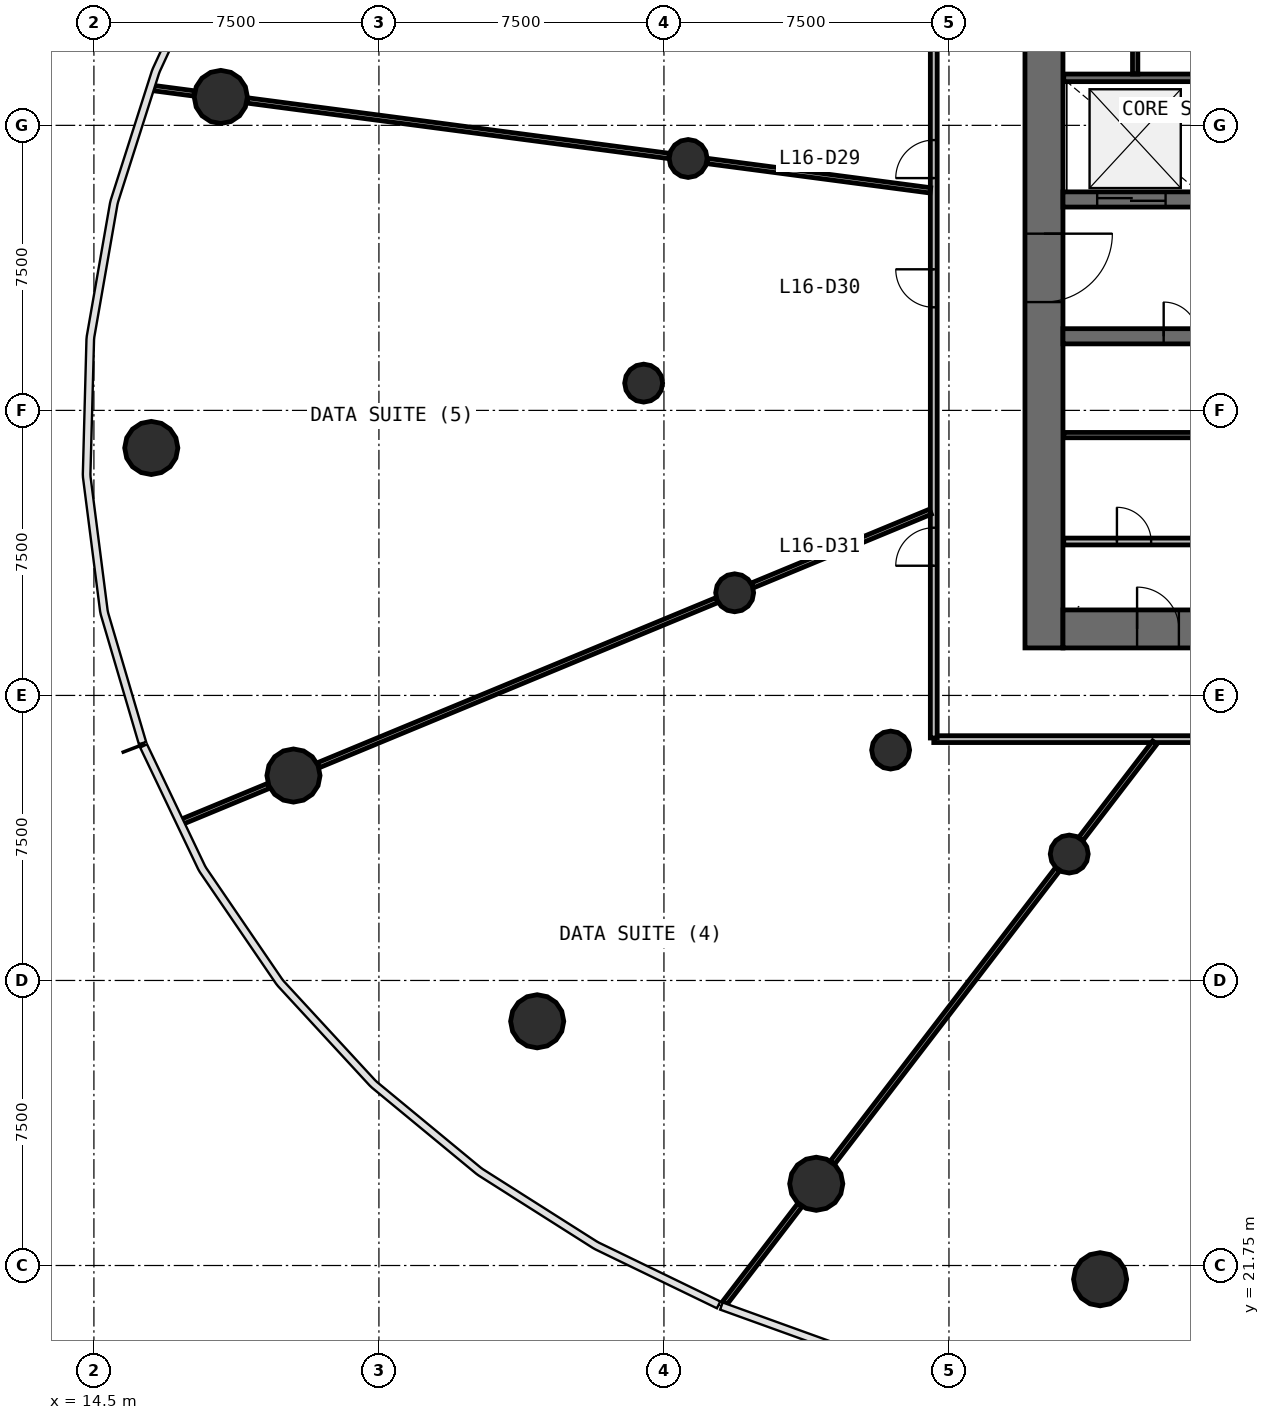
"""IFC4 building model, lengths in metres.
Left out: names, types, materials, properties, quantities, classifications, styles, units other than length and angle.
Written with IfcOpenShell. Run it as: python <this file> out.ifc"""

import sys

from ifc_helpers import new_model, si_unit, direction, frame, frame_2d, origin, origin_2d, place, context, subcontext, project, spatial, rectangle, circle, extrude, source, transform, mapped, element, fill, save


model = new_model("IFC4")
c1 = context("Model", 3, precision=1e-05, world=origin(), true_north=direction((0.0, 1.0)))
c2 = subcontext(c1, "Body", "Model", "MODEL_VIEW")
j1 = project(units=[si_unit("LENGTHUNIT", "METRE"), si_unit("PLANEANGLEUNIT", "RADIAN")], contexts=[c1])
p1 = place(None, origin())
s1 = spatial("IfcSite", under=j1, at=p1, CompositionType="ELEMENT")
p2 = place(p1, origin())
s2 = spatial("IfcBuilding", under=s1, at=p2, CompositionType="ELEMENT")
p3 = place(p2, frame((0.0, 0.0, 71.0)))
s3 = spatial("IfcBuildingStorey", under=s2, at=p3, CompositionType="ELEMENT", Elevation=71.0)
p4 = place(p3, frame((39.5, 58.0, 0.0), z_axis=(0.0, 0.0, 1.0), x_axis=(0.0, -1.0, 0.0)))
e1 = element("IfcWall", 1, at=p4, inside=s3, PredefinedType="SHEAR", context=c2, shape_type="SweptSolid", body=[
    extrude(rectangle(XDim=20.0, YDim=1.0, at=frame_2d((10.0, 0.0))), origin(), (0.0, 0.0, 1.0), 4.4),
])
p5 = place(p4, frame((9.1, 0.0, 0.0)))
e2 = element("IfcOpeningElement", 2, at=p5, cuts=e1, PredefinedType="OPENING", context=c2, shape_type="SweptSolid", body=[
    extrude(rectangle(XDim=1.8, YDim=2.1, at=frame_2d((0.9, 1.05))), frame((0.0, 0.51, 0.0), z_axis=(0.0, -1.0, 0.0), x_axis=(1.0, 0.0, 0.0)), (0.0, 0.0, 1.0), 1.02),
])
p6 = place(p3, frame((40.0, 38.5, 0.0), z_axis=(0.0, 0.0, 1.0), x_axis=(1.0, 0.0, 0.0)))
e3 = element("IfcWall", 3, at=p6, inside=s3, PredefinedType="SHEAR", context=c2, shape_type="SweptSolid", body=[
    extrude(rectangle(XDim=24.0, YDim=1.0, at=frame_2d((12.0, 0.0))), origin(), (0.0, 0.0, 1.0), 4.4),
])
p7 = place(p6, frame((21.45, 0.0, 0.0)))
e4 = element("IfcOpeningElement", 4, at=p7, cuts=e3, PredefinedType="OPENING", context=c2, shape_type="SweptSolid", body=[
    extrude(rectangle(XDim=1.1, YDim=2.1, at=frame_2d((0.55, 1.05))), frame((0.0, 0.51, 0.0), z_axis=(0.0, -1.0, 0.0), x_axis=(1.0, 0.0, 0.0)), (0.0, 0.0, 1.0), 1.02),
])
p8 = place(p6, frame((1.95, 0.0, 0.0)))
e5 = element("IfcOpeningElement", 5, at=p8, cuts=e3, PredefinedType="OPENING", context=c2, shape_type="SweptSolid", body=[
    extrude(rectangle(XDim=1.1, YDim=2.1, at=frame_2d((0.55, 1.05))), frame((0.0, 0.51, 0.0), z_axis=(0.0, -1.0, 0.0), x_axis=(1.0, 0.0, 0.0)), (0.0, 0.0, 1.0), 1.02),
])
p9 = place(p3, frame((40.0, 49.8, 0.0), z_axis=(0.0, 0.0, 1.0), x_axis=(1.0, 0.0, 0.0)))
e6 = element("IfcWall", 6, at=p9, inside=s3, PredefinedType="SHEAR", context=c2, shape_type="SweptSolid", body=[
    extrude(rectangle(XDim=24.0, YDim=0.4, at=frame_2d((12.0, 0.0))), origin(), (0.0, 0.0, 1.0), 4.4),
])
p10 = place(p9, frame((4.5, 0.0, 0.0)))
e7 = element("IfcOpeningElement", 7, at=p10, cuts=e6, PredefinedType="OPENING", context=c2, shape_type="SweptSolid", body=[
    extrude(rectangle(XDim=1.1, YDim=2.1, at=frame_2d((0.55, 1.05))), frame((0.0, 0.21, 0.0), z_axis=(0.0, -1.0, 0.0), x_axis=(1.0, 0.0, 0.0)), (0.0, 0.0, 1.0), 0.42),
])
p11 = place(p9, frame((7.0, 0.0, 0.0)))
e8 = element("IfcOpeningElement", 8, at=p11, cuts=e6, PredefinedType="OPENING", context=c2, shape_type="SweptSolid", body=[
    extrude(rectangle(XDim=1.1, YDim=2.1, at=frame_2d((0.55, 1.05))), frame((0.0, 0.21, 0.0), z_axis=(0.0, -1.0, 0.0), x_axis=(1.0, 0.0, 0.0)), (0.0, 0.0, 1.0), 0.42),
])
p12 = place(p9, frame((9.5, 0.0, 0.0)))
e9 = element("IfcOpeningElement", 9, at=p12, cuts=e6, PredefinedType="OPENING", context=c2, shape_type="SweptSolid", body=[
    extrude(rectangle(XDim=1.1, YDim=2.1, at=frame_2d((0.55, 1.05))), frame((0.0, 0.21, 0.0), z_axis=(0.0, -1.0, 0.0), x_axis=(1.0, 0.0, 0.0)), (0.0, 0.0, 1.0), 0.42),
])
p13 = place(p9, frame((0.9, 0.0, 0.0)))
e10 = element("IfcOpeningElement", 10, at=p13, cuts=e6, PredefinedType="OPENING", context=c2, shape_type="SweptSolid", body=[
    extrude(rectangle(XDim=1.8, YDim=2.4, at=frame_2d((0.9, 1.2))), frame((0.0, 0.21, 0.0), z_axis=(0.0, -1.0, 0.0), x_axis=(1.0, 0.0, 0.0)), (0.0, 0.0, 1.0), 0.42),
])
p14 = place(p9, frame((20.45, 0.0, 0.0)))
e11 = element("IfcOpeningElement", 11, at=p14, cuts=e6, PredefinedType="OPENING", context=c2, shape_type="SweptSolid", body=[
    extrude(rectangle(XDim=0.9, YDim=2.1, at=frame_2d((0.45, 1.05))), frame((0.0, 0.21, 0.0), z_axis=(0.0, -1.0, 0.0), x_axis=(1.0, 0.0, 0.0)), (0.0, 0.0, 1.0), 0.42),
])
p15 = place(p9, frame((11.65, 0.0, 0.0)))
e12 = element("IfcOpeningElement", 12, at=p15, cuts=e6, PredefinedType="OPENING", context=c2, shape_type="SweptSolid", body=[
    extrude(rectangle(XDim=0.9, YDim=2.1, at=frame_2d((0.45, 1.05))), frame((0.0, 0.21, 0.0), z_axis=(0.0, -1.0, 0.0), x_axis=(1.0, 0.0, 0.0)), (0.0, 0.0, 1.0), 0.42),
])
p16 = place(p3, frame((40.0, 46.2, 0.0), z_axis=(0.0, 0.0, 1.0), x_axis=(1.0, 0.0, 0.0)))
e13 = element("IfcWall", 13, at=p16, inside=s3, PredefinedType="SHEAR", context=c2, shape_type="SweptSolid", body=[
    extrude(rectangle(XDim=24.0, YDim=0.4, at=frame_2d((12.0, 0.0))), origin(), (0.0, 0.0, 1.0), 4.4),
])
p17 = place(p16, frame((4.5, 0.0, 0.0)))
e14 = element("IfcOpeningElement", 14, at=p17, cuts=e13, PredefinedType="OPENING", context=c2, shape_type="SweptSolid", body=[
    extrude(rectangle(XDim=1.1, YDim=2.1, at=frame_2d((0.55, 1.05))), frame((0.0, 0.21, 0.0), z_axis=(0.0, -1.0, 0.0), x_axis=(1.0, 0.0, 0.0)), (0.0, 0.0, 1.0), 0.42),
])
p18 = place(p16, frame((7.0, 0.0, 0.0)))
e15 = element("IfcOpeningElement", 15, at=p18, cuts=e13, PredefinedType="OPENING", context=c2, shape_type="SweptSolid", body=[
    extrude(rectangle(XDim=1.1, YDim=2.1, at=frame_2d((0.55, 1.05))), frame((0.0, 0.21, 0.0), z_axis=(0.0, -1.0, 0.0), x_axis=(1.0, 0.0, 0.0)), (0.0, 0.0, 1.0), 0.42),
])
p19 = place(p16, frame((9.5, 0.0, 0.0)))
e16 = element("IfcOpeningElement", 16, at=p19, cuts=e13, PredefinedType="OPENING", context=c2, shape_type="SweptSolid", body=[
    extrude(rectangle(XDim=1.1, YDim=2.1, at=frame_2d((0.55, 1.05))), frame((0.0, 0.21, 0.0), z_axis=(0.0, -1.0, 0.0), x_axis=(1.0, 0.0, 0.0)), (0.0, 0.0, 1.0), 0.42),
])
p20 = place(p16, frame((20.45, 0.0, 0.0)))
e17 = element("IfcOpeningElement", 17, at=p20, cuts=e13, PredefinedType="OPENING", context=c2, shape_type="SweptSolid", body=[
    extrude(rectangle(XDim=0.9, YDim=2.1, at=frame_2d((0.45, 1.05))), frame((0.0, 0.21, 0.0), z_axis=(0.0, -1.0, 0.0), x_axis=(1.0, 0.0, 0.0)), (0.0, 0.0, 1.0), 0.42),
])
p21 = place(p16, frame((2.65, 0.0, 0.0)))
e18 = element("IfcOpeningElement", 18, at=p21, cuts=e13, PredefinedType="OPENING", context=c2, shape_type="SweptSolid", body=[
    extrude(rectangle(XDim=0.9, YDim=2.1, at=frame_2d((0.45, 1.05))), frame((0.0, 0.21, 0.0), z_axis=(0.0, -1.0, 0.0), x_axis=(1.0, 0.0, 0.0)), (0.0, 0.0, 1.0), 0.42),
])
p22 = place(p16, frame((11.65, 0.0, 0.0)))
e19 = element("IfcOpeningElement", 19, at=p22, cuts=e13, PredefinedType="OPENING", context=c2, shape_type="SweptSolid", body=[
    extrude(rectangle(XDim=0.9, YDim=2.1, at=frame_2d((0.45, 1.05))), frame((0.0, 0.21, 0.0), z_axis=(0.0, -1.0, 0.0), x_axis=(1.0, 0.0, 0.0)), (0.0, 0.0, 1.0), 0.42),
])
m1 = source(origin(), c2, "Body", "SweptSolid", [
    extrude(circle(Radius=0.7, at=origin_2d()), origin(), (0.0, 0.0, 1.0), 4.4),
])
for number, where, z_axis, x_axis in (
    (20, (17.839, 52.497, 0.0), (0.0, 0.0, 1.0), (1.0, 0.0, 0.0)),
    (21, (16.01, 43.262, 0.0), (0.0, 0.0, 1.0), (1.0, 0.0, 0.0)),
    (22, (19.751, 34.642, 0.0), (0.0, 0.0, 1.0), (1.0, 0.0, 0.0)),
    (23, (26.164, 28.176, 0.0), (0.0, 0.0, 1.0), (1.0, 0.0, 0.0)),
    (24, (33.508, 23.9, 0.0), (0.0, 0.0, 1.0), (1.0, 0.0, 0.0)),
    (25, (40.977, 21.389, 0.0), (0.0, 0.0, 1.0), (1.0, 0.0, 0.0)),
):
    element("IfcColumn", number, at=place(p3, frame(where, z_axis=z_axis, x_axis=x_axis)), inside=s3, PredefinedType="COLUMN", context=c2, shape_type="MappedRepresentation", body=[
        mapped(m1, transform((0.0, 0.0, 0.0), scale=1.0)),
    ])
m2 = source(origin(), c2, "Body", "SweptSolid", [
    extrude(circle(Radius=0.5, at=origin_2d()), origin(), (0.0, 0.0, 1.0), 4.4),
])
for number, where, z_axis, x_axis in (
    (26, (30.137, 50.878, 0.0), (0.0, 0.0, 1.0), (1.0, 0.0, 0.0)),
    (27, (28.966, 44.968, 0.0), (0.0, 0.0, 1.0), (1.0, 0.0, 0.0)),
    (28, (31.361, 39.451, 0.0), (0.0, 0.0, 1.0), (1.0, 0.0, 0.0)),
    (29, (35.465, 35.312, 0.0), (0.0, 0.0, 1.0), (1.0, 0.0, 0.0)),
    (30, (40.165, 32.576, 0.0), (0.0, 0.0, 1.0), (1.0, 0.0, 0.0)),
):
    element("IfcColumn", number, at=place(p3, frame(where, z_axis=z_axis, x_axis=x_axis)), inside=s3, PredefinedType="COLUMN", context=c2, shape_type="MappedRepresentation", body=[
        mapped(m2, transform((0.0, 0.0, 0.0), scale=1.0)),
    ])
p23 = place(p3, frame((43.8, 53.0, 0.0), z_axis=(0.0, 0.0, 1.0), x_axis=(-1.0, 0.0, 0.0)))
e31 = element("IfcWall", 31, at=p23, inside=s3, PredefinedType="SOLIDWALL", context=c2, shape_type="SweptSolid", body=[
    extrude(rectangle(XDim=3.78, YDim=0.2, at=frame_2d((1.89, 0.0))), origin(), (0.0, 0.0, 1.0), 3.9),
])
p24 = place(p3, frame((67.4, 35.6, 0.0), z_axis=(0.0, 0.0, 1.0), x_axis=(-1.0, 0.0, 0.0)))
e32 = element("IfcWall", 32, at=p24, inside=s3, PredefinedType="PARTITIONING", context=c2, shape_type="SweptSolid", body=[
    extrude(rectangle(XDim=30.8, YDim=0.18, at=frame_2d((15.4, 0.0))), origin(), (0.0, 0.0, 1.0), 3.0),
])
p25 = place(p24, frame((14.95, 0.0, 0.0)))
e33 = element("IfcOpeningElement", 33, at=p25, cuts=e32, PredefinedType="OPENING", context=c2, shape_type="SweptSolid", body=[
    extrude(rectangle(XDim=1.0, YDim=2.1, at=frame_2d((0.5, 1.05))), frame((0.0, 0.1, 0.0), z_axis=(0.0, -1.0, 0.0), x_axis=(1.0, 0.0, 0.0)), (0.0, 0.0, 1.0), 0.2),
])
p26 = place(p24, frame((12.55, 0.0, 0.0)))
e34 = element("IfcOpeningElement", 34, at=p26, cuts=e32, PredefinedType="OPENING", context=c2, shape_type="SweptSolid", body=[
    extrude(rectangle(XDim=1.0, YDim=2.1, at=frame_2d((0.5, 1.05))), frame((0.0, 0.1, 0.0), z_axis=(0.0, -1.0, 0.0), x_axis=(1.0, 0.0, 0.0)), (0.0, 0.0, 1.0), 0.2),
])
p27 = place(p3, frame((36.6, 35.63, 0.0), z_axis=(0.0, 0.0, 1.0), x_axis=(0.0, 1.0, 0.0)))
e35 = element("IfcWall", 35, at=p27, inside=s3, PredefinedType="PARTITIONING", context=c2, shape_type="SweptSolid", body=[
    extrude(rectangle(XDim=23.583, YDim=0.18, at=frame_2d((11.791, 0.0))), origin(), (0.0, 0.0, 1.0), 3.0),
])
p28 = place(p27, frame((19.133, 0.0, 0.0)))
e36 = element("IfcOpeningElement", 36, at=p28, cuts=e35, PredefinedType="OPENING", context=c2, shape_type="SweptSolid", body=[
    extrude(rectangle(XDim=1.0, YDim=2.1, at=frame_2d((0.5, 1.05))), frame((0.0, 0.1, 0.0), z_axis=(0.0, -1.0, 0.0), x_axis=(1.0, 0.0, 0.0)), (0.0, 0.0, 1.0), 0.2),
])
p29 = place(p27, frame((14.732, 0.0, 0.0)))
e37 = element("IfcOpeningElement", 37, at=p29, cuts=e35, PredefinedType="OPENING", context=c2, shape_type="SweptSolid", body=[
    extrude(rectangle(XDim=1.0, YDim=2.1, at=frame_2d((0.5, 1.05))), frame((0.0, 0.1, 0.0), z_axis=(0.0, -1.0, 0.0), x_axis=(1.0, 0.0, 0.0)), (0.0, 0.0, 1.0), 0.2),
])
p30 = place(p27, frame((11.333, 0.0, 0.0)))
e38 = element("IfcOpeningElement", 38, at=p30, cuts=e35, PredefinedType="OPENING", context=c2, shape_type="SweptSolid", body=[
    extrude(rectangle(XDim=1.0, YDim=2.1, at=frame_2d((0.5, 1.05))), frame((0.0, 0.1, 0.0), z_axis=(0.0, -1.0, 0.0), x_axis=(1.0, 0.0, 0.0)), (0.0, 0.0, 1.0), 0.2),
])
p31 = place(p27, frame((4.532, 0.0, 0.0)))
e39 = element("IfcOpeningElement", 39, at=p31, cuts=e35, PredefinedType="OPENING", context=c2, shape_type="SweptSolid", body=[
    extrude(rectangle(XDim=1.0, YDim=2.1, at=frame_2d((0.5, 1.05))), frame((0.0, 0.1, 0.0), z_axis=(0.0, -1.0, 0.0), x_axis=(1.0, 0.0, 0.0)), (0.0, 0.0, 1.0), 0.2),
])
p32 = place(p3, frame((40.02, 40.8, 0.0), z_axis=(0.0, 0.0, 1.0), x_axis=(1.0, 0.0, 0.0)))
e40 = element("IfcWall", 40, at=p32, inside=s3, PredefinedType="PARTITIONING", context=c2, shape_type="SweptSolid", body=[
    extrude(rectangle(XDim=3.75, YDim=0.18, at=frame_2d((1.875, 0.0))), origin(), (0.0, 0.0, 1.0), 3.9),
])
p33 = place(p32, frame((1.4, 0.0, 0.0)))
e41 = element("IfcOpeningElement", 41, at=p33, cuts=e40, PredefinedType="OPENING", context=c2, shape_type="SweptSolid", body=[
    extrude(rectangle(XDim=0.9, YDim=2.1, at=frame_2d((0.45, 1.05))), frame((0.0, 0.1, 0.0), z_axis=(0.0, -1.0, 0.0), x_axis=(1.0, 0.0, 0.0)), (0.0, 0.0, 1.0), 0.2),
])
p34 = place(p3, frame((30.894, 39.258, 0.0), z_axis=(0.0, 0.0, 1.0), x_axis=(-0.923875075531, -0.382694192291, 0.0)))
e42 = element("IfcWall", 42, at=p34, inside=s3, PredefinedType="PARTITIONING", context=c2, shape_type="SweptSolid", body=[
    extrude(rectangle(XDim=11.356, YDim=0.14, at=frame_2d((5.678, 0.0))), origin(), (0.0, 0.0, 1.0), 3.0),
])
p35 = place(p3, frame((29.637, 50.944, 0.0), z_axis=(0.0, 0.0, 1.0), x_axis=(-0.991443306772, 0.130538000051, 0.0)))
e43 = element("IfcWall", 43, at=p35, inside=s3, PredefinedType="PARTITIONING", context=c2, shape_type="SweptSolid", body=[
    extrude(rectangle(XDim=11.195, YDim=0.14, at=frame_2d((5.598, 0.0))), origin(), (0.0, 0.0, 1.0), 3.0),
])
p36 = place(p3, frame((39.858, 32.176, 0.0), z_axis=(0.0, 0.0, 1.0), x_axis=(-0.608770295053, -0.793346537057, 0.0)))
e44 = element("IfcWall", 44, at=p36, inside=s3, PredefinedType="PARTITIONING", context=c2, shape_type="SweptSolid", body=[
    extrude(rectangle(XDim=9.727, YDim=0.14, at=frame_2d((4.864, 0.0))), origin(), (0.0, 0.0, 1.0), 3.0),
])
p37 = place(p3, frame((36.51, 50.039, 0.0), z_axis=(0.0, 0.0, 1.0), x_axis=(-0.991445034615, 0.130524876315, 0.0)))
e45 = element("IfcWall", 45, at=p37, inside=s3, PredefinedType="PARTITIONING", context=c2, shape_type="SweptSolid", body=[
    extrude(rectangle(XDim=5.924, YDim=0.14, at=frame_2d((2.962, 0.0))), origin(), (0.0, 0.0, 1.0), 3.0),
])
p38 = place(p3, frame((36.51, 41.584, 0.0), z_axis=(0.0, 0.0, 1.0), x_axis=(-0.923890025086, -0.382658100067, 0.0)))
e46 = element("IfcWall", 46, at=p38, inside=s3, PredefinedType="PARTITIONING", context=c2, shape_type="SweptSolid", body=[
    extrude(rectangle(XDim=5.068, YDim=0.14, at=frame_2d((2.534, 0.0))), origin(), (0.0, 0.0, 1.0), 3.0),
])
p39 = place(p3, frame((43.77, 43.6, 0.0), z_axis=(0.0, 0.0, 1.0), x_axis=(-1.0, 0.0, 0.0)))
e47 = element("IfcWall", 47, at=p39, inside=s3, PredefinedType="PARTITIONING", context=c2, shape_type="SweptSolid", body=[
    extrude(rectangle(XDim=3.75, YDim=0.14, at=frame_2d((1.875, 0.0))), origin(), (0.0, 0.0, 1.0), 3.0),
])
p40 = place(p3, frame((42.416, 35.51, 0.0), z_axis=(0.0, 0.0, 1.0), x_axis=(-0.60874605662, -0.793365135703, 0.0)))
e48 = element("IfcWall", 48, at=p40, inside=s3, PredefinedType="PARTITIONING", context=c2, shape_type="SweptSolid", body=[
    extrude(rectangle(XDim=3.194, YDim=0.14, at=frame_2d((1.597, 0.0))), origin(), (0.0, 0.0, 1.0), 3.0),
])
p41 = place(p3, frame((33.079, 23.342, 0.0), z_axis=(0.0, 0.0, 1.0), x_axis=(-0.608787991926, -0.793332957141, 0.0)))
e49 = element("IfcWall", 49, at=p41, inside=s3, PredefinedType="PARTITIONING", context=c2, shape_type="SweptSolid", body=[
    extrude(rectangle(XDim=3.249, YDim=0.14, at=frame_2d((1.625, 0.0))), origin(), (0.0, 0.0, 1.0), 3.0),
])
p42 = place(p3, frame((19.1, 34.372, 0.0), z_axis=(0.0, 0.0, 1.0), x_axis=(-0.92388481198, -0.382670686352, 0.0)))
e50 = element("IfcWall", 50, at=p42, inside=s3, PredefinedType="PARTITIONING", context=c2, shape_type="SweptSolid", body=[
    extrude(rectangle(XDim=2.479, YDim=0.14, at=frame_2d((1.24, 0.0))), origin(), (0.0, 0.0, 1.0), 3.0),
])
p43 = place(p3, frame((41.9, 53.1, 0.0), z_axis=(0.0, 0.0, 1.0), x_axis=(0.0, 1.0, 0.0)))
e51 = element("IfcWall", 51, at=p43, inside=s3, PredefinedType="PARTITIONING", context=c2, shape_type="SweptSolid", body=[
    extrude(rectangle(XDim=2.01, YDim=0.14, at=frame_2d((1.005, 0.0))), origin(), (0.0, 0.0, 1.0), 3.0),
])
p44 = place(p3, frame((17.141, 52.589, 0.0), z_axis=(0.0, 0.0, 1.0), x_axis=(-0.991441129852, 0.130554532814, 0.0)))
e52 = element("IfcWall", 52, at=p44, inside=s3, PredefinedType="PARTITIONING", context=c2, shape_type="SweptSolid", body=[
    extrude(rectangle(XDim=1.073, YDim=0.14, at=frame_2d((0.537, 0.0))), origin(), (0.0, 0.0, 1.0), 3.0),
])
m3 = source(origin(), c2, "Body", "SweptSolid", [
    extrude(rectangle(XDim=1.8, YDim=2.1, at=frame_2d((0.9, 1.05))), frame((0.0, 0.025, 0.0), z_axis=(0.0, -1.0, 0.0), x_axis=(1.0, 0.0, 0.0)), (0.0, 0.0, 1.0), 0.05),
])
p45 = place(p5, origin())
e53 = element("IfcDoor", 53, at=p45, inside=s3, OperationType="SINGLE_SWING_LEFT", PredefinedType="DOOR", context=c2, shape_type="MappedRepresentation", body=[
    mapped(m3, transform((0.0, 0.0, 0.0), scale=1.0)),
])
fill(e2, e53)
m4 = source(origin(), c2, "Body", "SweptSolid", [
    extrude(rectangle(XDim=1.8, YDim=2.4, at=frame_2d((0.9, 1.2))), frame((0.0, 0.025, 0.0), z_axis=(0.0, -1.0, 0.0), x_axis=(1.0, 0.0, 0.0)), (0.0, 0.0, 1.0), 0.05),
])
p46 = place(p13, origin())
e54 = element("IfcDoor", 54, at=p46, inside=s3, OperationType="DOUBLE_DOOR_SLIDING", PredefinedType="USERDEFINED", context=c2, shape_type="MappedRepresentation", body=[
    mapped(m4, transform((0.0, 0.0, 0.0), scale=1.0)),
])
fill(e10, e54)
m5 = source(origin(), c2, "Body", "SweptSolid", [
    extrude(rectangle(XDim=1.1, YDim=2.1, at=frame_2d((0.55, 1.05))), frame((0.0, 0.025, 0.0), z_axis=(0.0, -1.0, 0.0), x_axis=(1.0, 0.0, 0.0)), (0.0, 0.0, 1.0), 0.05),
])
p47 = place(p8, origin())
e55 = element("IfcDoor", 55, at=p47, inside=s3, OperationType="SINGLE_SWING_LEFT", PredefinedType="DOOR", context=c2, shape_type="MappedRepresentation", body=[
    mapped(m5, transform((0.0, 0.0, 0.0), scale=1.0)),
])
fill(e5, e55)
m6 = source(origin(), c2, "Body", "SweptSolid", [
    extrude(rectangle(XDim=1.0, YDim=2.1, at=frame_2d((0.5, 1.05))), frame((0.0, 0.025, 0.0), z_axis=(0.0, -1.0, 0.0), x_axis=(1.0, 0.0, 0.0)), (0.0, 0.0, 1.0), 0.05),
])
p48 = place(p29, origin())
e56 = element("IfcDoor", 56, at=p48, inside=s3, OperationType="SINGLE_SWING_LEFT", PredefinedType="DOOR", context=c2, shape_type="MappedRepresentation", body=[
    mapped(m6, transform((0.0, 0.0, 0.0), scale=1.0)),
])
fill(e37, e56)
p49 = place(p30, origin())
e57 = element("IfcDoor", 57, at=p49, inside=s3, OperationType="SINGLE_SWING_RIGHT", PredefinedType="DOOR", context=c2, shape_type="MappedRepresentation", body=[
    mapped(m6, transform((0.0, 0.0, 0.0), scale=1.0)),
])
fill(e38, e57)
p50 = place(p31, origin())
e58 = element("IfcDoor", 58, at=p50, inside=s3, OperationType="SINGLE_SWING_LEFT", PredefinedType="DOOR", context=c2, shape_type="MappedRepresentation", body=[
    mapped(m6, transform((0.0, 0.0, 0.0), scale=1.0)),
])
fill(e39, e58)
m7 = source(origin(), c2, "Body", "SweptSolid", [
    extrude(rectangle(XDim=0.9, YDim=2.1, at=frame_2d((0.45, 1.05))), frame((0.0, 0.025, 0.0), z_axis=(0.0, -1.0, 0.0), x_axis=(1.0, 0.0, 0.0)), (0.0, 0.0, 1.0), 0.05),
])
p51 = place(p33, origin())
e59 = element("IfcDoor", 59, at=p51, inside=s3, OperationType="SINGLE_SWING_LEFT", PredefinedType="DOOR", context=c2, shape_type="MappedRepresentation", body=[
    mapped(m7, transform((0.0, 0.0, 0.0), scale=1.0)),
])
fill(e41, e59)
p52 = place(p21, origin())
e60 = element("IfcDoor", 60, at=p52, inside=s3, OperationType="SINGLE_SWING_LEFT", PredefinedType="DOOR", context=c2, shape_type="MappedRepresentation", body=[
    mapped(m7, transform((0.0, 0.0, 0.0), scale=1.0)),
])
fill(e18, e60)
save(model, sys.argv[1])
